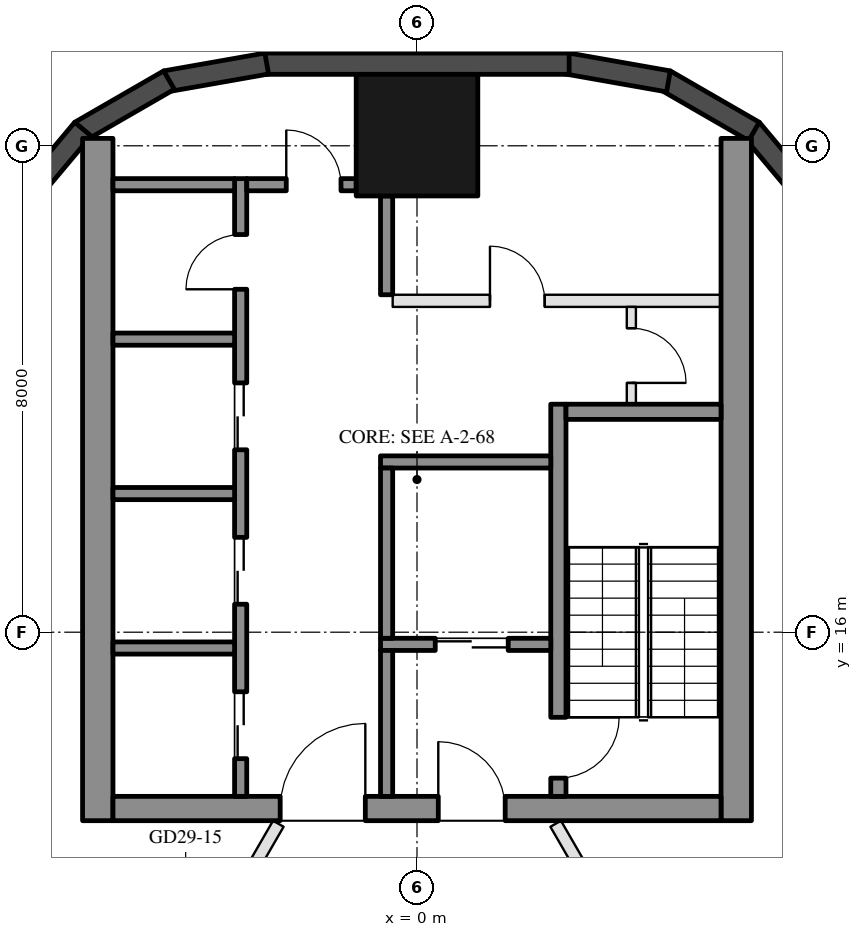
"""IFC4 building model, lengths in metres.
Left out: names, types, materials, properties, quantities, classifications, styles, units other than length and angle.
Written with IfcOpenShell. Run it as: python <this file> out.ifc"""

import sys

from ifc_helpers import new_model, si_unit, direction, frame, frame_2d, origin, origin_2d, place, context, subcontext, project, spatial, rectangle, hollow_rectangle, extrude, boolean, halfspace, element, fill, save


model = new_model("IFC4")
c1 = context("Model", 3, precision=1e-05, world=origin(), true_north=direction((0.0, 1.0)))
c2 = subcontext(c1, "Body", "Model", "MODEL_VIEW")
j1 = project(units=[si_unit("LENGTHUNIT", "METRE"), si_unit("PLANEANGLEUNIT", "RADIAN")], contexts=[c1])
p1 = place(None, origin())
s1 = spatial("IfcSite", under=j1, at=p1, CompositionType="ELEMENT")
p2 = place(p1, origin())
s2 = spatial("IfcBuilding", under=s1, at=p2, CompositionType="ELEMENT")
p3 = place(p2, frame((0.0, 0.0, 294.8)))
s3 = spatial("IfcBuildingStorey", under=s2, at=p3, CompositionType="ELEMENT", Elevation=294.8)
p4 = place(p3, frame((0.0, 24.175, 0.0), z_axis=(0.0, 0.0, 1.0), x_axis=(1.0, 0.0, 0.0)))
e1 = element("IfcColumn", 1, at=p4, inside=s3, PredefinedType="COLUMN", context=c2, shape_type="SweptSolid", body=[
    boolean("DIFFERENCE", extrude(hollow_rectangle(XDim=2.0, YDim=2.0, WallThickness=0.05, at=origin_2d()), origin(), (0.0, 0.0, 1.0), 3.7), halfspace(frame((0.0, 0.0, 3.587), z_axis=(0.0, 0.0, 1.0), x_axis=(1.0, 0.0, 0.0)), False)),
])
for number, where, z_axis, x_axis in (
    (2, (6.581, 22.98, 0.0), (0.0, 0.0, 1.0), (-0.643, 0.766, 0.0)),
    (3, (5.542, 24.236, 0.0), (0.0, 0.0, 1.0), (-0.866, 0.5, 0.0)),
    (4, (4.135, 25.059, 0.0), (0.0, 0.0, 1.0), (-0.985, 0.174, 0.0)),
):
    element("IfcWall", number, at=place(p3, frame(where, z_axis=z_axis, x_axis=x_axis)), inside=s3, PredefinedType="SOLIDWALL", context=c2, shape_type="SweptSolid", body=[
        extrude(rectangle(XDim=1.689, YDim=0.35, at=frame_2d((0.845, 0.0))), origin(), (0.0, 0.0, 1.0), 3.55),
    ])
p5 = place(p3, frame((2.502, 25.35, 0.0), z_axis=(0.0, 0.0, 1.0), x_axis=(-1.0, 0.0, 0.0)))
e5 = element("IfcWall", 5, at=p5, inside=s3, PredefinedType="SOLIDWALL", context=c2, shape_type="SweptSolid", body=[
    extrude(rectangle(XDim=5.004, YDim=0.35, at=frame_2d((2.502, 0.0))), origin(), (0.0, 0.0, 1.0), 3.55),
])
for number, where, z_axis, x_axis in (
    (6, (-2.472, 25.353, 0.0), (0.0, 0.0, 1.0), (-0.985, -0.174, 0.0)),
    (7, (-4.078, 25.08, 0.0), (0.0, 0.0, 1.0), (-0.866, -0.5, 0.0)),
    (8, (-5.495, 24.274, 0.0), (0.0, 0.0, 1.0), (-0.643, -0.766, 0.0)),
):
    element("IfcWall", number, at=place(p3, frame(where, z_axis=z_axis, x_axis=x_axis)), inside=s3, PredefinedType="SOLIDWALL", context=c2, shape_type="SweptSolid", body=[
        extrude(rectangle(XDim=1.689, YDim=0.35, at=frame_2d((0.845, 0.0))), origin(), (0.0, 0.0, 1.0), 3.55),
    ])
for number, where, z_axis, x_axis in (
    (9, (5.25, 12.9, 0.0), (0.0, 0.0, 1.0), (0.0, 1.0, 0.0)),
    (10, (-5.25, 12.9, 0.0), (0.0, 0.0, 1.0), (0.0, 1.0, 0.0)),
):
    element("IfcWall", number, at=place(p3, frame(where, z_axis=z_axis, x_axis=x_axis)), inside=s3, PredefinedType="SHEAR", context=c2, shape_type="SweptSolid", body=[
        extrude(rectangle(XDim=11.222, YDim=0.5, at=frame_2d((5.611, 0.0))), origin(), (0.0, 0.0, 1.0), 3.5),
    ])
p6 = place(p3, frame((5.0, 13.1, 0.0), z_axis=(0.0, 0.0, 1.0), x_axis=(-1.0, 0.0, 0.0)))
e11 = element("IfcWall", 11, at=p6, inside=s3, PredefinedType="SHEAR", context=c2, shape_type="SweptSolid", body=[
    extrude(rectangle(XDim=10.0, YDim=0.4, at=frame_2d((5.0, 0.0))), origin(), (0.0, 0.0, 1.0), 3.5),
])
p7 = place(p6, frame((3.55, 0.0, 0.0)))
e12 = element("IfcOpeningElement", 12, at=p7, cuts=e11, PredefinedType="OPENING", context=c2, shape_type="SweptSolid", body=[
    extrude(rectangle(XDim=1.1, YDim=2.1, at=frame_2d((0.55, 1.05))), frame((0.0, 0.21, 0.0), z_axis=(0.0, -1.0, 0.0), x_axis=(1.0, 0.0, 0.0)), (0.0, 0.0, 1.0), 0.42),
])
p8 = place(p6, frame((5.85, 0.0, 0.0)))
e13 = element("IfcOpeningElement", 13, at=p8, cuts=e11, PredefinedType="OPENING", context=c2, shape_type="SweptSolid", body=[
    extrude(rectangle(XDim=1.4, YDim=2.1, at=frame_2d((0.7, 1.05))), frame((0.0, 0.21, 0.0), z_axis=(0.0, -1.0, 0.0), x_axis=(1.0, 0.0, 0.0)), (0.0, 0.0, 1.0), 0.42),
])
p9 = place(p3, frame((2.325, 13.3, 0.0), z_axis=(0.0, 0.0, 1.0), x_axis=(0.0, 1.0, 0.0)))
e14 = element("IfcWall", 14, at=p9, inside=s3, PredefinedType="SHEAR", context=c2, shape_type="SweptSolid", body=[
    extrude(rectangle(XDim=6.45, YDim=0.25, at=frame_2d((3.225, 0.0))), origin(), (0.0, 0.0, 1.0), 3.5),
])
p10 = place(p9, frame((0.3, 0.0, 0.0)))
e15 = element("IfcOpeningElement", 15, at=p10, cuts=e14, PredefinedType="OPENING", context=c2, shape_type="SweptSolid", body=[
    extrude(rectangle(XDim=1.0, YDim=2.1, at=frame_2d((0.5, 1.05))), frame((0.0, 0.135, 0.0), z_axis=(0.0, -1.0, 0.0), x_axis=(1.0, 0.0, 0.0)), (0.0, 0.0, 1.0), 0.27),
])
p11 = place(p3, frame((5.0, 19.625, 0.0), z_axis=(0.0, 0.0, 1.0), x_axis=(-1.0, 0.0, 0.0)))
e16 = element("IfcWall", 16, at=p11, inside=s3, PredefinedType="SHEAR", context=c2, shape_type="SweptSolid", body=[
    extrude(rectangle(XDim=2.55, YDim=0.25, at=frame_2d((1.275, 0.0))), origin(), (0.0, 0.0, 1.0), 3.5),
])
p12 = place(p3, frame((2.2, 18.8, 0.0), z_axis=(0.0, 0.0, 1.0), x_axis=(-1.0, 0.0, 0.0)))
e17 = element("IfcWall", 17, at=p12, inside=s3, PredefinedType="SHEAR", context=c2, shape_type="SweptSolid", body=[
    extrude(rectangle(XDim=2.8, YDim=0.2, at=frame_2d((1.4, 0.0))), origin(), (0.0, 0.0, 1.0), 3.5),
])
p13 = place(p3, frame((2.2, 15.8, 0.0), z_axis=(0.0, 0.0, 1.0), x_axis=(-1.0, 0.0, 0.0)))
e18 = element("IfcWall", 18, at=p13, inside=s3, PredefinedType="SHEAR", context=c2, shape_type="SweptSolid", body=[
    extrude(rectangle(XDim=2.8, YDim=0.2, at=frame_2d((1.4, 0.0))), origin(), (0.0, 0.0, 1.0), 3.5),
])
p14 = place(p13, frame((0.7, 0.0, 0.0)))
e19 = element("IfcOpeningElement", 19, at=p14, cuts=e18, PredefinedType="OPENING", context=c2, shape_type="SweptSolid", body=[
    extrude(rectangle(XDim=1.2, YDim=2.1, at=frame_2d((0.6, 1.05))), frame((0.0, 0.11, 0.0), z_axis=(0.0, -1.0, 0.0), x_axis=(1.0, 0.0, 0.0)), (0.0, 0.0, 1.0), 0.22),
])
p15 = place(p3, frame((-0.5, 15.9, 0.0), z_axis=(0.0, 0.0, 1.0), x_axis=(0.0, 1.0, 0.0)))
e20 = element("IfcWall", 20, at=p15, inside=s3, PredefinedType="SHEAR", context=c2, shape_type="SweptSolid", body=[
    extrude(rectangle(XDim=2.8, YDim=0.2, at=frame_2d((1.4, 0.0))), origin(), (0.0, 0.0, 1.0), 3.5),
])
p16 = place(p3, frame((-0.5, 13.3, 0.0), z_axis=(0.0, 0.0, 1.0), x_axis=(0.0, 1.0, 0.0)))
e21 = element("IfcWall", 21, at=p16, inside=s3, PredefinedType="SHEAR", context=c2, shape_type="SweptSolid", body=[
    extrude(rectangle(XDim=2.4, YDim=0.2, at=frame_2d((1.2, 0.0))), origin(), (0.0, 0.0, 1.0), 3.5),
])
p17 = place(p3, frame((-2.9, 13.3, 0.0), z_axis=(0.0, 0.0, 1.0), x_axis=(0.0, 1.0, 0.0)))
e22 = element("IfcWall", 22, at=p17, inside=s3, PredefinedType="SHEAR", context=c2, shape_type="SweptSolid", body=[
    extrude(rectangle(XDim=10.16, YDim=0.2, at=frame_2d((5.08, 0.0))), origin(), (0.0, 0.0, 1.0), 3.5),
])
p18 = place(p17, frame((0.62, 0.0, 0.0)))
e23 = element("IfcOpeningElement", 23, at=p18, cuts=e22, PredefinedType="OPENING", context=c2, shape_type="SweptSolid", body=[
    extrude(rectangle(XDim=1.1, YDim=2.1, at=frame_2d((0.55, 1.05))), frame((0.0, 0.11, 0.0), z_axis=(0.0, -1.0, 0.0), x_axis=(1.0, 0.0, 0.0)), (0.0, 0.0, 1.0), 0.22),
])
p19 = place(p17, frame((3.16, 0.0, 0.0)))
e24 = element("IfcOpeningElement", 24, at=p19, cuts=e22, PredefinedType="OPENING", context=c2, shape_type="SweptSolid", body=[
    extrude(rectangle(XDim=1.1, YDim=2.1, at=frame_2d((0.55, 1.05))), frame((0.0, 0.11, 0.0), z_axis=(0.0, -1.0, 0.0), x_axis=(1.0, 0.0, 0.0)), (0.0, 0.0, 1.0), 0.22),
])
p20 = place(p17, frame((5.7, 0.0, 0.0)))
e25 = element("IfcOpeningElement", 25, at=p20, cuts=e22, PredefinedType="OPENING", context=c2, shape_type="SweptSolid", body=[
    extrude(rectangle(XDim=1.1, YDim=2.1, at=frame_2d((0.55, 1.05))), frame((0.0, 0.11, 0.0), z_axis=(0.0, -1.0, 0.0), x_axis=(1.0, 0.0, 0.0)), (0.0, 0.0, 1.0), 0.22),
])
p21 = place(p17, frame((8.34, 0.0, 0.0)))
e26 = element("IfcOpeningElement", 26, at=p21, cuts=e22, PredefinedType="OPENING", context=c2, shape_type="SweptSolid", body=[
    extrude(rectangle(XDim=0.9, YDim=2.1, at=frame_2d((0.45, 1.05))), frame((0.0, 0.11, 0.0), z_axis=(0.0, -1.0, 0.0), x_axis=(1.0, 0.0, 0.0)), (0.0, 0.0, 1.0), 0.22),
])
p22 = place(p3, frame((-1.0, 23.36, 0.0), z_axis=(0.0, 0.0, 1.0), x_axis=(-1.0, 0.0, 0.0)))
e27 = element("IfcWall", 27, at=p22, inside=s3, PredefinedType="SHEAR", context=c2, shape_type="SweptSolid", body=[
    extrude(rectangle(XDim=1.8, YDim=0.2, at=frame_2d((0.9, 0.0))), origin(), (0.0, 0.0, 1.0), 3.5),
])
p23 = place(p22, frame((0.25, 0.0, 0.0)))
e28 = element("IfcOpeningElement", 28, at=p23, cuts=e27, PredefinedType="OPENING", context=c2, shape_type="SweptSolid", body=[
    extrude(rectangle(XDim=0.9, YDim=2.1, at=frame_2d((0.45, 1.05))), frame((0.0, 0.11, 0.0), z_axis=(0.0, -1.0, 0.0), x_axis=(1.0, 0.0, 0.0)), (0.0, 0.0, 1.0), 0.22),
])
p24 = place(p3, frame((-0.5, 21.55, 0.0), z_axis=(0.0, 0.0, 1.0), x_axis=(0.0, 1.0, 0.0)))
e29 = element("IfcWall", 29, at=p24, inside=s3, PredefinedType="SHEAR", context=c2, shape_type="SweptSolid", body=[
    extrude(rectangle(XDim=1.625, YDim=0.2, at=frame_2d((0.812, 0.0))), origin(), (0.0, 0.0, 1.0), 3.5),
])
for number, where, z_axis, x_axis in (
    (30, (-3.0, 15.74, 0.0), (0.0, 0.0, 1.0), (-1.0, 0.0, 0.0)),
    (31, (-3.0, 18.28, 0.0), (0.0, 0.0, 1.0), (-1.0, 0.0, 0.0)),
    (32, (-3.0, 20.82, 0.0), (0.0, 0.0, 1.0), (-1.0, 0.0, 0.0)),
    (33, (-3.0, 23.36, 0.0), (0.0, 0.0, 1.0), (-1.0, 0.0, 0.0)),
):
    element("IfcWall", number, at=place(p3, frame(where, z_axis=z_axis, x_axis=x_axis)), inside=s3, PredefinedType="SHEAR", context=c2, shape_type="SweptSolid", body=[
        extrude(rectangle(XDim=2.0, YDim=0.2, at=frame_2d((1.0, 0.0))), origin(), (0.0, 0.0, 1.0), 3.5),
    ])
p25 = place(p3, frame((5.0, 21.45, 0.0), z_axis=(0.0, 0.0, 1.0), x_axis=(-1.0, 0.0, 0.0)))
e34 = element("IfcWall", 34, at=p25, inside=s3, PredefinedType="PARTITIONING", context=c2, shape_type="SweptSolid", body=[
    extrude(rectangle(XDim=5.4, YDim=0.2, at=frame_2d((2.7, 0.0))), origin(), (0.0, 0.0, 1.0), 3.5),
])
p26 = place(p25, frame((2.9, 0.0, 0.0)))
e35 = element("IfcOpeningElement", 35, at=p26, cuts=e34, PredefinedType="OPENING", context=c2, shape_type="SweptSolid", body=[
    extrude(rectangle(XDim=0.9, YDim=2.1, at=frame_2d((0.45, 1.05))), frame((0.0, 0.11, 0.0), z_axis=(0.0, -1.0, 0.0), x_axis=(1.0, 0.0, 0.0)), (0.0, 0.0, 1.0), 0.22),
])
p27 = place(p3, frame((3.525, 19.75, 0.0), z_axis=(0.0, 0.0, 1.0), x_axis=(0.0, 1.0, 0.0)))
e36 = element("IfcWall", 36, at=p27, inside=s3, PredefinedType="PARTITIONING", context=c2, shape_type="SweptSolid", body=[
    extrude(rectangle(XDim=1.6, YDim=0.15, at=frame_2d((0.8, 0.0))), origin(), (0.0, 0.0, 1.0), 3.5),
])
p28 = place(p27, frame((0.35, 0.0, 0.0)))
e37 = element("IfcOpeningElement", 37, at=p28, cuts=e36, PredefinedType="OPENING", context=c2, shape_type="SweptSolid", body=[
    extrude(rectangle(XDim=0.9, YDim=2.1, at=frame_2d((0.45, 1.05))), frame((0.0, 0.085, 0.0), z_axis=(0.0, -1.0, 0.0), x_axis=(1.0, 0.0, 0.0)), (0.0, 0.0, 1.0), 0.17),
])
p29 = place(p3, frame((-10.302, 13.698, 0.0), z_axis=(0.0, 0.0, 1.0), x_axis=(0.737268015828, -0.675600379541, 0.0)))
e38 = element("IfcWall", 38, at=p29, inside=s3, PredefinedType="PARTITIONING", context=c2, shape_type="SweptSolid", body=[
    extrude(rectangle(XDim=7.653, YDim=0.2, at=frame_2d((3.826, 0.0))), origin(), (0.0, 0.0, 1.0), 3.1),
])
p30 = place(p3, frame((2.281, 12.85, 0.0), z_axis=(0.0, 0.0, 1.0), x_axis=(0.500002143212, -0.866024166397, 0.0)))
e39 = element("IfcWall", 39, at=p30, inside=s3, PredefinedType="PARTITIONING", context=c2, shape_type="SweptSolid", body=[
    extrude(rectangle(XDim=11.888, YDim=0.2, at=frame_2d((5.944, 0.0))), origin(), (0.0, 0.0, 1.0), 3.05),
])
p31 = place(p30, frame((8.438, 0.0, 0.0)))
e40 = element("IfcOpeningElement", 40, at=p31, cuts=e39, PredefinedType="OPENING", context=c2, shape_type="SweptSolid", body=[
    extrude(rectangle(XDim=1.0, YDim=2.1, at=frame_2d((0.5, 1.05))), frame((0.0, 0.11, 0.0), z_axis=(0.0, -1.0, 0.0), x_axis=(1.0, 0.0, 0.0)), (0.0, 0.0, 1.0), 0.22),
])
p32 = place(p3, frame((-4.685, 8.686, 0.0), z_axis=(0.0, 0.0, 1.0), x_axis=(0.500011088314, 0.866019001848, 0.0)))
e41 = element("IfcWall", 41, at=p32, inside=s3, PredefinedType="PARTITIONING", context=c2, shape_type="SweptSolid", body=[
    extrude(rectangle(XDim=4.808, YDim=0.2, at=frame_2d((2.404, 0.0))), origin(), (0.0, 0.0, 1.0), 3.05),
])
p33 = place(p32, frame((2.472, 0.0, 0.0)))
e42 = element("IfcOpeningElement", 42, at=p33, cuts=e41, PredefinedType="OPENING", context=c2, shape_type="SweptSolid", body=[
    extrude(rectangle(XDim=1.0, YDim=2.1, at=frame_2d((0.5, 1.05))), frame((0.0, 0.11, 0.0), z_axis=(0.0, -1.0, 0.0), x_axis=(1.0, 0.0, 0.0)), (0.0, 0.0, 1.0), 0.22),
])
p34 = place(p14, origin())
e43 = element("IfcDoor", 43, at=p34, inside=s3, OperationType="DOUBLE_DOOR_SLIDING", PredefinedType="DOOR", context=c2, shape_type="SweptSolid", body=[
    extrude(rectangle(XDim=1.2, YDim=2.1, at=frame_2d((0.6, 1.05))), frame((0.0, 0.025, 0.0), z_axis=(0.0, -1.0, 0.0), x_axis=(1.0, 0.0, 0.0)), (0.0, 0.0, 1.0), 0.05),
])
fill(e19, e43)
p35 = place(p28, frame((0.9, 0.0, 0.0), z_axis=(0.0, 0.0, 1.0), x_axis=(-1.0, 0.0, 0.0)))
e44 = element("IfcDoor", 44, at=p35, inside=s3, OperationType="SINGLE_SWING_RIGHT", PredefinedType="DOOR", context=c2, shape_type="SweptSolid", body=[
    extrude(rectangle(XDim=0.9, YDim=2.1, at=frame_2d((0.45, 1.05))), frame((0.0, 0.025, 0.0), z_axis=(0.0, -1.0, 0.0), x_axis=(1.0, 0.0, 0.0)), (0.0, 0.0, 1.0), 0.05),
])
fill(e37, e44)
p36 = place(p18, origin())
e45 = element("IfcDoor", 45, at=p36, inside=s3, OperationType="DOUBLE_DOOR_SLIDING", PredefinedType="DOOR", context=c2, shape_type="SweptSolid", body=[
    extrude(rectangle(XDim=1.1, YDim=2.1, at=frame_2d((0.55, 1.05))), frame((0.0, 0.025, 0.0), z_axis=(0.0, -1.0, 0.0), x_axis=(1.0, 0.0, 0.0)), (0.0, 0.0, 1.0), 0.05),
])
fill(e23, e45)
p37 = place(p19, origin())
e46 = element("IfcDoor", 46, at=p37, inside=s3, OperationType="DOUBLE_DOOR_SLIDING", PredefinedType="DOOR", context=c2, shape_type="SweptSolid", body=[
    extrude(rectangle(XDim=1.1, YDim=2.1, at=frame_2d((0.55, 1.05))), frame((0.0, 0.025, 0.0), z_axis=(0.0, -1.0, 0.0), x_axis=(1.0, 0.0, 0.0)), (0.0, 0.0, 1.0), 0.05),
])
fill(e24, e46)
p38 = place(p20, origin())
e47 = element("IfcDoor", 47, at=p38, inside=s3, OperationType="DOUBLE_DOOR_SLIDING", PredefinedType="DOOR", context=c2, shape_type="SweptSolid", body=[
    extrude(rectangle(XDim=1.1, YDim=2.1, at=frame_2d((0.55, 1.05))), frame((0.0, 0.025, 0.0), z_axis=(0.0, -1.0, 0.0), x_axis=(1.0, 0.0, 0.0)), (0.0, 0.0, 1.0), 0.05),
])
fill(e25, e47)
p39 = place(p21, origin())
e48 = element("IfcDoor", 48, at=p39, inside=s3, OperationType="SINGLE_SWING_LEFT", PredefinedType="DOOR", context=c2, shape_type="SweptSolid", body=[
    extrude(rectangle(XDim=0.9, YDim=2.1, at=frame_2d((0.45, 1.05))), frame((0.0, 0.025, 0.0), z_axis=(0.0, -1.0, 0.0), x_axis=(1.0, 0.0, 0.0)), (0.0, 0.0, 1.0), 0.05),
])
fill(e26, e48)
p40 = place(p23, frame((0.9, 0.0, 0.0), z_axis=(0.0, 0.0, 1.0), x_axis=(-1.0, 0.0, 0.0)))
e49 = element("IfcDoor", 49, at=p40, inside=s3, OperationType="SINGLE_SWING_LEFT", PredefinedType="DOOR", context=c2, shape_type="SweptSolid", body=[
    extrude(rectangle(XDim=0.9, YDim=2.1, at=frame_2d((0.45, 1.05))), frame((0.0, 0.025, 0.0), z_axis=(0.0, -1.0, 0.0), x_axis=(1.0, 0.0, 0.0)), (0.0, 0.0, 1.0), 0.05),
])
fill(e28, e49)
p41 = place(p26, frame((0.9, 0.0, 0.0), z_axis=(0.0, 0.0, 1.0), x_axis=(-1.0, 0.0, 0.0)))
e50 = element("IfcDoor", 50, at=p41, inside=s3, OperationType="SINGLE_SWING_LEFT", PredefinedType="DOOR", context=c2, shape_type="SweptSolid", body=[
    extrude(rectangle(XDim=0.9, YDim=2.1, at=frame_2d((0.45, 1.05))), frame((0.0, 0.025, 0.0), z_axis=(0.0, -1.0, 0.0), x_axis=(1.0, 0.0, 0.0)), (0.0, 0.0, 1.0), 0.05),
])
fill(e35, e50)
p42 = place(p7, frame((1.1, 0.0, 0.0), z_axis=(0.0, 0.0, 1.0), x_axis=(-1.0, 0.0, 0.0)))
e51 = element("IfcDoor", 51, at=p42, inside=s3, OperationType="SINGLE_SWING_LEFT", PredefinedType="DOOR", context=c2, shape_type="SweptSolid", body=[
    extrude(rectangle(XDim=1.1, YDim=2.1, at=frame_2d((0.55, 1.05))), frame((0.0, 0.025, 0.0), z_axis=(0.0, -1.0, 0.0), x_axis=(1.0, 0.0, 0.0)), (0.0, 0.0, 1.0), 0.05),
])
fill(e12, e51)
p43 = place(p8, frame((1.4, 0.0, 0.0), z_axis=(0.0, 0.0, 1.0), x_axis=(-1.0, 0.0, 0.0)))
e52 = element("IfcDoor", 52, at=p43, inside=s3, OperationType="DOUBLE_DOOR_SINGLE_SWING", PredefinedType="DOOR", context=c2, shape_type="SweptSolid", body=[
    extrude(rectangle(XDim=1.4, YDim=2.1, at=frame_2d((0.7, 1.05))), frame((0.0, 0.025, 0.0), z_axis=(0.0, -1.0, 0.0), x_axis=(1.0, 0.0, 0.0)), (0.0, 0.0, 1.0), 0.05),
])
fill(e13, e52)
p44 = place(p10, frame((1.0, 0.0, 0.0), z_axis=(0.0, 0.0, 1.0), x_axis=(-1.0, 0.0, 0.0)))
e53 = element("IfcDoor", 53, at=p44, inside=s3, OperationType="SINGLE_SWING_LEFT", PredefinedType="DOOR", context=c2, shape_type="SweptSolid", body=[
    extrude(rectangle(XDim=1.0, YDim=2.1, at=frame_2d((0.5, 1.05))), frame((0.0, 0.025, 0.0), z_axis=(0.0, -1.0, 0.0), x_axis=(1.0, 0.0, 0.0)), (0.0, 0.0, 1.0), 0.05),
])
fill(e15, e53)
save(model, sys.argv[1])
